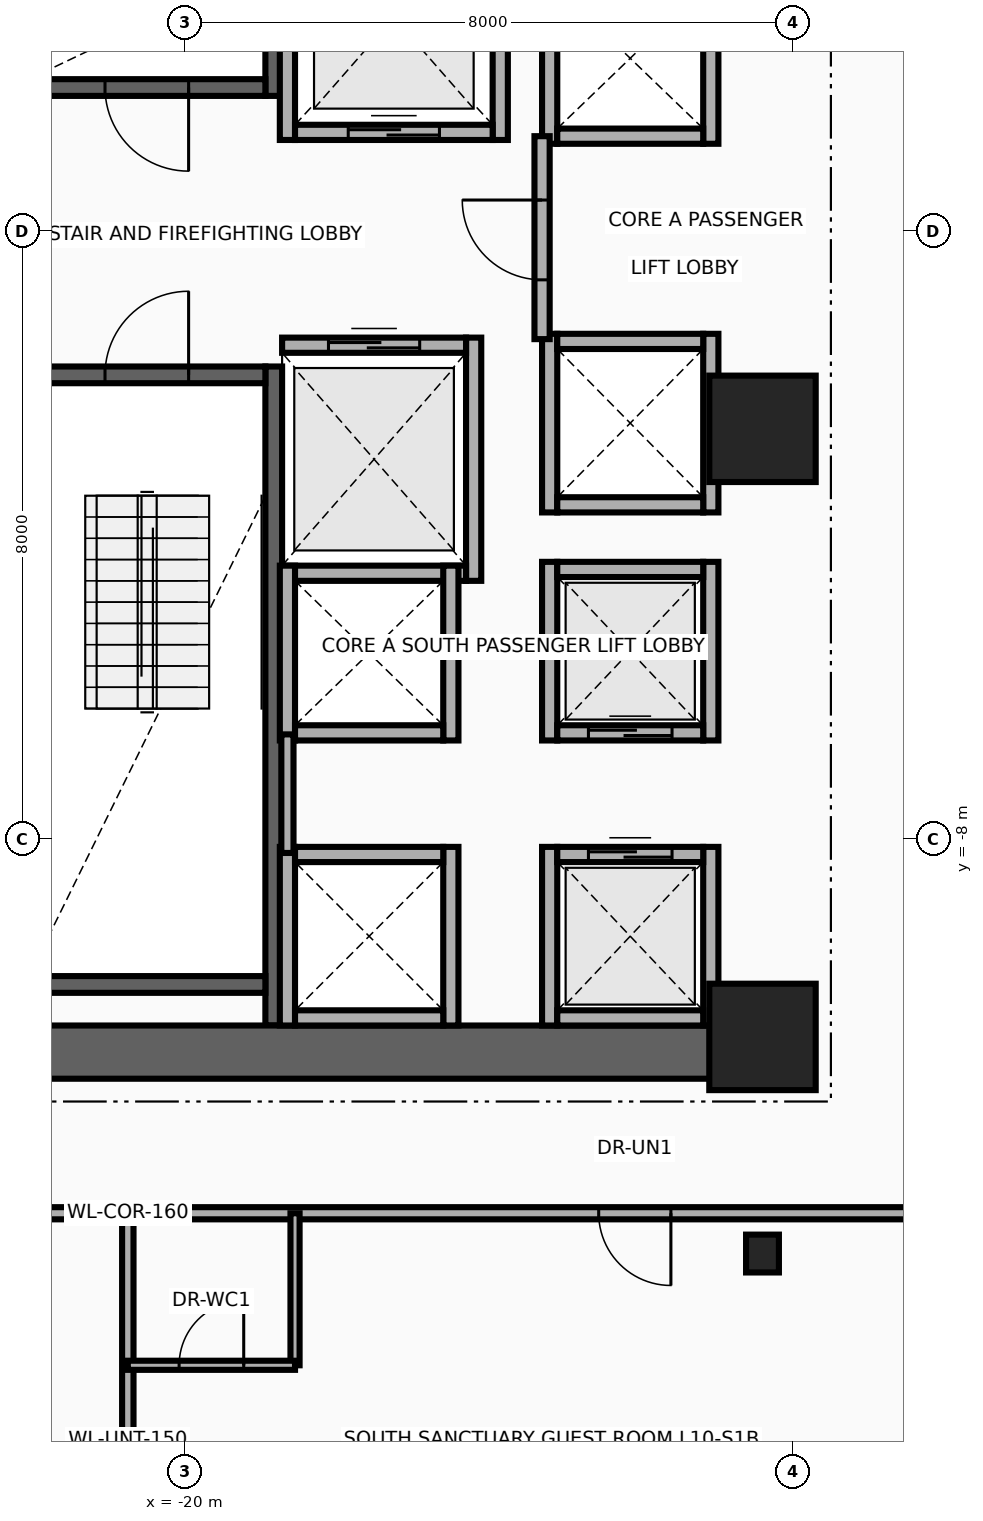
"""IFC4 building model, lengths in metres.
Left out: names, types, materials, properties, quantities, classifications, styles, units other than length and angle.
Written with IfcOpenShell. Run it as: python <this file> out.ifc"""

import sys

from ifc_helpers import new_model, si_unit, direction, frame, frame_2d, origin, origin_2d, place, context, subcontext, project, spatial, rectangle, i_section, extrude, source, transform, mapped, element, fill, save


model = new_model("IFC4")
c1 = context("Model", 3, precision=1e-05, world=origin(), true_north=direction((0.0, 1.0)))
c2 = subcontext(c1, "Body", "Model", "MODEL_VIEW")
j1 = project(units=[si_unit("LENGTHUNIT", "METRE"), si_unit("PLANEANGLEUNIT", "RADIAN")], contexts=[c1])
p1 = place(None, origin())
s1 = spatial("IfcSite", under=j1, at=p1, CompositionType="ELEMENT")
p2 = place(p1, origin())
s2 = spatial("IfcBuilding", under=s1, at=p2, CompositionType="ELEMENT")
p3 = place(p2, frame((0.0, 0.0, 44.5)))
s3 = spatial("IfcBuildingStorey", under=s2, at=p3, CompositionType="ELEMENT", Elevation=44.5)
p4 = place(p3, frame((-18.83, 1.78, 0.0), z_axis=(0.0, 0.0, 1.0), x_axis=(0.0, 1.0, 0.0)))
e1 = element("IfcWall", 1, at=p4, inside=s3, PredefinedType="SHEAR", context=c2, shape_type="SweptSolid", body=[
    extrude(rectangle(XDim=8.67, YDim=0.22, at=frame_2d((4.335, 0.0))), origin(), (0.0, 0.0, 1.0), 3.46),
])
p5 = place(p3, frame((-22.05, 1.89, 0.0), z_axis=(0.0, 0.0, 1.0), x_axis=(1.0, 0.0, 0.0)))
e2 = element("IfcWall", 2, at=p5, inside=s3, PredefinedType="SHEAR", context=c2, shape_type="SweptSolid", body=[
    extrude(rectangle(XDim=3.11, YDim=0.22, at=frame_2d((1.555, 0.0))), origin(), (0.0, 0.0, 1.0), 3.46),
])
p6 = place(p5, frame((1.0, 0.0, 0.0)))
e3 = element("IfcOpeningElement", 3, at=p6, cuts=e2, PredefinedType="OPENING", context=c2, shape_type="SweptSolid", body=[
    extrude(rectangle(XDim=1.1, YDim=2.15, at=frame_2d((0.55, 1.075))), frame((0.0, 0.125, 0.0), z_axis=(0.0, -1.0, 0.0), x_axis=(1.0, 0.0, 0.0)), (0.0, 0.0, 1.0), 0.25),
])
p7 = place(p3, frame((-18.83, -10.45, 0.0), z_axis=(0.0, 0.0, 1.0), x_axis=(0.0, 1.0, 0.0)))
e4 = element("IfcWall", 4, at=p7, inside=s3, PredefinedType="SHEAR", context=c2, shape_type="SweptSolid", body=[
    extrude(rectangle(XDim=8.67, YDim=0.22, at=frame_2d((4.335, 0.0))), origin(), (0.0, 0.0, 1.0), 3.46),
])
p8 = place(p3, frame((-22.05, -9.91, 0.0), z_axis=(0.0, 0.0, 1.0), x_axis=(1.0, 0.0, 0.0)))
e5 = element("IfcWall", 5, at=p8, inside=s3, PredefinedType="SHEAR", context=c2, shape_type="SweptSolid", body=[
    extrude(rectangle(XDim=3.11, YDim=0.22, at=frame_2d((1.555, 0.0))), origin(), (0.0, 0.0, 1.0), 3.46),
])
p9 = place(p3, frame((-22.05, -1.89, 0.0), z_axis=(0.0, 0.0, 1.0), x_axis=(1.0, 0.0, 0.0)))
e6 = element("IfcWall", 6, at=p9, inside=s3, PredefinedType="SHEAR", context=c2, shape_type="SweptSolid", body=[
    extrude(rectangle(XDim=3.11, YDim=0.22, at=frame_2d((1.555, 0.0))), origin(), (0.0, 0.0, 1.0), 3.46),
])
p10 = place(p9, frame((1.0, 0.0, 0.0)))
e7 = element("IfcOpeningElement", 7, at=p10, cuts=e6, PredefinedType="OPENING", context=c2, shape_type="SweptSolid", body=[
    extrude(rectangle(XDim=1.1, YDim=2.15, at=frame_2d((0.55, 1.075))), frame((0.0, 0.125, 0.0), z_axis=(0.0, -1.0, 0.0), x_axis=(1.0, 0.0, 0.0)), (0.0, 0.0, 1.0), 0.25),
])
p11 = place(p3, frame((-22.65, -10.8, 0.0), z_axis=(0.0, 0.0, 1.0), x_axis=(1.0, 0.0, 0.0)))
e8 = element("IfcWall", 8, at=p11, inside=s3, PredefinedType="SHEAR", context=c2, shape_type="SweptSolid", body=[
    extrude(rectangle(XDim=10.25, YDim=0.7, at=frame_2d((5.125, 0.0))), origin(), (0.0, 0.0, 1.0), 3.46),
])
m1 = source(origin(), c2, "Body", "SweptSolid", [
    extrude(rectangle(XDim=1.4, YDim=1.4, at=origin_2d()), origin(), (0.0, 0.0, 1.0), 3.7),
])
for number, where, z_axis, x_axis in (
    (9, (-12.4, -10.6, 0.0), (0.0, 0.0, 1.0), (1.0, 0.0, 0.0)),
    (10, (-12.4, -2.6, 0.0), (0.0, 0.0, 1.0), (1.0, 0.0, 0.0)),
):
    element("IfcColumn", number, at=place(p3, frame(where, z_axis=z_axis, x_axis=x_axis)), inside=s3, PredefinedType="COLUMN", context=c2, shape_type="MappedRepresentation", body=[
        mapped(m1, transform((0.0, 0.0, 0.0), x_axis=(1.0, 0.0, 0.0), y_axis=(0.0, 1.0, 0.0), z_axis=(0.0, 0.0, 1.0), scale=1.0)),
    ])
m2 = source(origin(), c2, "Body", "SweptSolid", [
    extrude(i_section(OverallWidth=0.432, OverallDepth=0.498, WebThickness=0.056, FlangeThickness=0.089, at=origin_2d()), origin(), (0.0, 0.0, 1.0), 3.7),
])
p12 = place(p3, frame((-12.4, -13.45, 0.0), z_axis=(0.0, 0.0, 1.0), x_axis=(1.0, 0.0, 0.0)))
e11 = element("IfcColumn", 11, at=p12, inside=s3, PredefinedType="COLUMN", context=c2, shape_type="MappedRepresentation", body=[
    mapped(m2, transform((0.0, 0.0, 0.0), x_axis=(1.0, 0.0, 0.0), y_axis=(0.0, 1.0, 0.0), z_axis=(0.0, 0.0, 1.0), scale=1.0)),
])
for number, where, z_axis, x_axis in (
    (12, (-18.65, 1.2, 0.0), (0.0, 0.0, 1.0), (0.0, 1.0, 0.0)),
    (13, (-15.85, 1.2, 0.0), (0.0, 0.0, 1.0), (0.0, 1.0, 0.0)),
):
    element("IfcWall", number, at=place(p3, frame(where, z_axis=z_axis, x_axis=x_axis)), inside=s3, PredefinedType="MOVABLE", context=c2, shape_type="SweptSolid", body=[
        extrude(rectangle(XDim=3.225, YDim=0.2, at=frame_2d((1.613, 0.0))), origin(), (0.0, 0.0, 1.0), 3.46),
    ])
p13 = place(p3, frame((-18.55, 1.3, 0.0), z_axis=(0.0, 0.0, 1.0), x_axis=(1.0, 0.0, 0.0)))
e14 = element("IfcWall", 14, at=p13, inside=s3, PredefinedType="MOVABLE", context=c2, shape_type="SweptSolid", body=[
    extrude(rectangle(XDim=2.6, YDim=0.2, at=frame_2d((1.3, 0.0))), origin(), (0.0, 0.0, 1.0), 3.46),
])
p14 = place(p13, frame((0.7, 0.0, 0.0)))
e15 = element("IfcOpeningElement", 15, at=p14, cuts=e14, PredefinedType="OPENING", context=c2, shape_type="SweptSolid", body=[
    extrude(rectangle(XDim=1.2, YDim=2.1, at=frame_2d((0.6, 1.05))), frame((0.0, 0.115, 0.0), z_axis=(0.0, -1.0, 0.0), x_axis=(1.0, 0.0, 0.0)), (0.0, 0.0, 1.0), 0.23),
])
p15 = place(p3, frame((-16.2, -4.6, 0.0), z_axis=(0.0, 0.0, 1.0), x_axis=(0.0, 1.0, 0.0)))
e16 = element("IfcWall", 16, at=p15, inside=s3, PredefinedType="MOVABLE", context=c2, shape_type="SweptSolid", body=[
    extrude(rectangle(XDim=3.2, YDim=0.2, at=frame_2d((1.6, 0.0))), origin(), (0.0, 0.0, 1.0), 3.46),
])
p16 = place(p3, frame((-18.72, -4.5, 0.0), z_axis=(0.0, 0.0, 1.0), x_axis=(1.0, 0.0, 0.0)))
e17 = element("IfcWall", 17, at=p16, inside=s3, PredefinedType="MOVABLE", context=c2, shape_type="SweptSolid", body=[
    extrude(rectangle(XDim=2.42, YDim=0.2, at=frame_2d((1.21, 0.0))), origin(), (0.0, 0.0, 1.0), 3.46),
])
p17 = place(p3, frame((-18.72, -1.5, 0.0), z_axis=(0.0, 0.0, 1.0), x_axis=(1.0, 0.0, 0.0)))
e18 = element("IfcWall", 18, at=p17, inside=s3, PredefinedType="MOVABLE", context=c2, shape_type="SweptSolid", body=[
    extrude(rectangle(XDim=2.42, YDim=0.2, at=frame_2d((1.21, 0.0))), origin(), (0.0, 0.0, 1.0), 3.46),
])
p18 = place(p17, frame((0.61, 0.0, 0.0)))
e19 = element("IfcOpeningElement", 19, at=p18, cuts=e18, PredefinedType="OPENING", context=c2, shape_type="SweptSolid", body=[
    extrude(rectangle(XDim=1.2, YDim=2.1, at=frame_2d((0.6, 1.05))), frame((0.0, 0.115, 0.0), z_axis=(0.0, -1.0, 0.0), x_axis=(1.0, 0.0, 0.0)), (0.0, 0.0, 1.0), 0.23),
])
for number, where, z_axis, x_axis in (
    (20, (-15.2, -10.45, 0.0), (0.0, 0.0, 1.0), (0.0, 1.0, 0.0)),
    (21, (-13.08, -10.45, 0.0), (0.0, 0.0, 1.0), (0.0, 1.0, 0.0)),
):
    element("IfcWall", number, at=place(p3, frame(where, z_axis=z_axis, x_axis=x_axis)), inside=s3, PredefinedType="MOVABLE", context=c2, shape_type="SweptSolid", body=[
        extrude(rectangle(XDim=2.35, YDim=0.2, at=frame_2d((1.175, 0.0))), origin(), (0.0, 0.0, 1.0), 2.583),
    ])
p19 = place(p3, frame((-15.1, -10.35, 0.0), z_axis=(0.0, 0.0, 1.0), x_axis=(1.0, 0.0, 0.0)))
e22 = element("IfcWall", 22, at=p19, inside=s3, PredefinedType="MOVABLE", context=c2, shape_type="SweptSolid", body=[
    extrude(rectangle(XDim=1.92, YDim=0.2, at=frame_2d((0.96, 0.0))), origin(), (0.0, 0.0, 1.0), 2.583),
])
p20 = place(p3, frame((-15.1, -8.2, 0.0), z_axis=(0.0, 0.0, 1.0), x_axis=(1.0, 0.0, 0.0)))
e23 = element("IfcWall", 23, at=p20, inside=s3, PredefinedType="MOVABLE", context=c2, shape_type="SweptSolid", body=[
    extrude(rectangle(XDim=1.92, YDim=0.2, at=frame_2d((0.96, 0.0))), origin(), (0.0, 0.0, 1.0), 3.46),
])
p21 = place(p20, frame((0.41, 0.0, 0.0)))
e24 = element("IfcOpeningElement", 24, at=p21, cuts=e23, PredefinedType="OPENING", context=c2, shape_type="SweptSolid", body=[
    extrude(rectangle(XDim=1.1, YDim=2.1, at=frame_2d((0.55, 1.05))), frame((0.0, 0.115, 0.0), z_axis=(0.0, -1.0, 0.0), x_axis=(1.0, 0.0, 0.0)), (0.0, 0.0, 1.0), 0.23),
])
for number, where, z_axis, x_axis in (
    (25, (-15.2, -6.7, 0.0), (0.0, 0.0, 1.0), (0.0, 1.0, 0.0)),
    (26, (-13.08, -6.7, 0.0), (0.0, 0.0, 1.0), (0.0, 1.0, 0.0)),
):
    element("IfcWall", number, at=place(p3, frame(where, z_axis=z_axis, x_axis=x_axis)), inside=s3, PredefinedType="MOVABLE", context=c2, shape_type="SweptSolid", body=[
        extrude(rectangle(XDim=2.35, YDim=0.2, at=frame_2d((1.175, 0.0))), origin(), (0.0, 0.0, 1.0), 3.46),
    ])
p22 = place(p3, frame((-15.1, -6.6, 0.0), z_axis=(0.0, 0.0, 1.0), x_axis=(1.0, 0.0, 0.0)))
e27 = element("IfcWall", 27, at=p22, inside=s3, PredefinedType="MOVABLE", context=c2, shape_type="SweptSolid", body=[
    extrude(rectangle(XDim=1.92, YDim=0.2, at=frame_2d((0.96, 0.0))), origin(), (0.0, 0.0, 1.0), 3.46),
])
p23 = place(p22, frame((0.41, 0.0, 0.0)))
e28 = element("IfcOpeningElement", 28, at=p23, cuts=e27, PredefinedType="OPENING", context=c2, shape_type="SweptSolid", body=[
    extrude(rectangle(XDim=1.1, YDim=2.1, at=frame_2d((0.55, 1.05))), frame((0.0, 0.115, 0.0), z_axis=(0.0, -1.0, 0.0), x_axis=(1.0, 0.0, 0.0)), (0.0, 0.0, 1.0), 0.23),
])
p24 = place(p3, frame((-15.1, -4.45, 0.0), z_axis=(0.0, 0.0, 1.0), x_axis=(1.0, 0.0, 0.0)))
e29 = element("IfcWall", 29, at=p24, inside=s3, PredefinedType="MOVABLE", context=c2, shape_type="SweptSolid", body=[
    extrude(rectangle(XDim=1.92, YDim=0.2, at=frame_2d((0.96, 0.0))), origin(), (0.0, 0.0, 1.0), 3.46),
])
for number, where, z_axis, x_axis in (
    (30, (-18.65, -10.45, 0.0), (0.0, 0.0, 1.0), (0.0, 1.0, 0.0)),
    (31, (-16.5, -10.45, 0.0), (0.0, 0.0, 1.0), (0.0, 1.0, 0.0)),
):
    element("IfcWall", number, at=place(p3, frame(where, z_axis=z_axis, x_axis=x_axis)), inside=s3, PredefinedType="MOVABLE", context=c2, shape_type="SweptSolid", body=[
        extrude(rectangle(XDim=2.35, YDim=0.2, at=frame_2d((1.175, 0.0))), origin(), (0.0, 0.0, 1.0), 2.583),
    ])
p25 = place(p3, frame((-18.55, -10.35, 0.0), z_axis=(0.0, 0.0, 1.0), x_axis=(1.0, 0.0, 0.0)))
e32 = element("IfcWall", 32, at=p25, inside=s3, PredefinedType="MOVABLE", context=c2, shape_type="SweptSolid", body=[
    extrude(rectangle(XDim=1.95, YDim=0.2, at=frame_2d((0.975, 0.0))), origin(), (0.0, 0.0, 1.0), 2.583),
])
p26 = place(p3, frame((-18.55, -8.2, 0.0), z_axis=(0.0, 0.0, 1.0), x_axis=(1.0, 0.0, 0.0)))
e33 = element("IfcWall", 33, at=p26, inside=s3, PredefinedType="MOVABLE", context=c2, shape_type="SweptSolid", body=[
    extrude(rectangle(XDim=1.95, YDim=0.2, at=frame_2d((0.975, 0.0))), origin(), (0.0, 0.0, 1.0), 3.46),
])
for number, where, z_axis, x_axis in (
    (34, (-15.2, 1.15, 0.0), (0.0, 0.0, 1.0), (0.0, 1.0, 0.0)),
    (35, (-13.08, 1.15, 0.0), (0.0, 0.0, 1.0), (0.0, 1.0, 0.0)),
):
    element("IfcWall", number, at=place(p3, frame(where, z_axis=z_axis, x_axis=x_axis)), inside=s3, PredefinedType="MOVABLE", context=c2, shape_type="SweptSolid", body=[
        extrude(rectangle(XDim=2.25, YDim=0.2, at=frame_2d((1.125, 0.0))), origin(), (0.0, 0.0, 1.0), 3.46),
    ])
p27 = place(p3, frame((-15.1, 1.25, 0.0), z_axis=(0.0, 0.0, 1.0), x_axis=(1.0, 0.0, 0.0)))
e36 = element("IfcWall", 36, at=p27, inside=s3, PredefinedType="MOVABLE", context=c2, shape_type="SweptSolid", body=[
    extrude(rectangle(XDim=1.92, YDim=0.2, at=frame_2d((0.96, 0.0))), origin(), (0.0, 0.0, 1.0), 3.46),
])
for number, where, z_axis, x_axis in (
    (37, (-18.65, -6.7, 0.0), (0.0, 0.0, 1.0), (0.0, 1.0, 0.0)),
    (38, (-16.5, -6.7, 0.0), (0.0, 0.0, 1.0), (0.0, 1.0, 0.0)),
):
    element("IfcWall", number, at=place(p3, frame(where, z_axis=z_axis, x_axis=x_axis)), inside=s3, PredefinedType="MOVABLE", context=c2, shape_type="SweptSolid", body=[
        extrude(rectangle(XDim=2.3, YDim=0.2, at=frame_2d((1.15, 0.0))), origin(), (0.0, 0.0, 1.0), 3.46),
    ])
p28 = place(p3, frame((-18.55, -6.6, 0.0), z_axis=(0.0, 0.0, 1.0), x_axis=(1.0, 0.0, 0.0)))
e39 = element("IfcWall", 39, at=p28, inside=s3, PredefinedType="MOVABLE", context=c2, shape_type="SweptSolid", body=[
    extrude(rectangle(XDim=1.95, YDim=0.2, at=frame_2d((0.975, 0.0))), origin(), (0.0, 0.0, 1.0), 3.46),
])
for number, where, z_axis, x_axis in (
    (40, (-15.2, -3.7, 0.0), (0.0, 0.0, 1.0), (0.0, 1.0, 0.0)),
    (41, (-13.08, -3.7, 0.0), (0.0, 0.0, 1.0), (0.0, 1.0, 0.0)),
):
    element("IfcWall", number, at=place(p3, frame(where, z_axis=z_axis, x_axis=x_axis)), inside=s3, PredefinedType="MOVABLE", context=c2, shape_type="SweptSolid", body=[
        extrude(rectangle(XDim=2.35, YDim=0.2, at=frame_2d((1.175, 0.0))), origin(), (0.0, 0.0, 1.0), 3.46),
    ])
for number, where, z_axis, x_axis in (
    (42, (-15.1, -3.6, 0.0), (0.0, 0.0, 1.0), (1.0, 0.0, 0.0)),
    (43, (-15.1, -1.45, 0.0), (0.0, 0.0, 1.0), (1.0, 0.0, 0.0)),
):
    element("IfcWall", number, at=place(p3, frame(where, z_axis=z_axis, x_axis=x_axis)), inside=s3, PredefinedType="MOVABLE", context=c2, shape_type="SweptSolid", body=[
        extrude(rectangle(XDim=1.92, YDim=0.2, at=frame_2d((0.96, 0.0))), origin(), (0.0, 0.0, 1.0), 3.46),
    ])
p29 = place(p3, frame((-15.3, -1.42, 0.0), z_axis=(0.0, 0.0, 1.0), x_axis=(0.0, 1.0, 0.0)))
e44 = element("IfcWall", 44, at=p29, inside=s3, PredefinedType="PARTITIONING", context=c2, shape_type="SweptSolid", body=[
    extrude(rectangle(XDim=2.67, YDim=0.2, at=frame_2d((1.335, 0.0))), origin(), (0.0, 0.0, 1.0), 3.46),
])
p30 = place(p29, frame((0.78, 0.0, 0.0)))
e45 = element("IfcOpeningElement", 45, at=p30, cuts=e44, PredefinedType="OPENING", context=c2, shape_type="SweptSolid", body=[
    extrude(rectangle(XDim=1.05, YDim=2.15, at=frame_2d((0.525, 1.075))), frame((0.0, 0.115, 0.0), z_axis=(0.0, -1.0, 0.0), x_axis=(1.0, 0.0, 0.0)), (0.0, 0.0, 1.0), 0.23),
])
p31 = place(p3, frame((-18.65, -8.18, 0.0), z_axis=(0.0, 0.0, 1.0), x_axis=(0.0, 1.0, 0.0)))
e46 = element("IfcWall", 46, at=p31, inside=s3, PredefinedType="PARTITIONING", context=c2, shape_type="SweptSolid", body=[
    extrude(rectangle(XDim=1.56, YDim=0.16, at=frame_2d((0.78, 0.0))), origin(), (0.0, 0.0, 1.0), 3.46),
])
p32 = place(p3, frame((-31.89, -12.92, 0.0), z_axis=(0.0, 0.0, 1.0), x_axis=(1.0, 0.0, 0.0)))
e47 = element("IfcWall", 47, at=p32, inside=s3, PredefinedType="PARTITIONING", context=c2, shape_type="SweptSolid", body=[
    extrude(rectangle(XDim=22.28, YDim=0.16, at=frame_2d((11.14, 0.0))), origin(), (0.0, 0.0, 1.0), 2.834),
])
p33 = place(p32, frame((6.195, 0.0, 0.0)))
e48 = element("IfcOpeningElement", 48, at=p33, cuts=e47, PredefinedType="OPENING", context=c2, shape_type="SweptSolid", body=[
    extrude(rectangle(XDim=0.95, YDim=2.15, at=frame_2d((0.475, 1.075))), frame((0.0, 0.095, 0.0), z_axis=(0.0, -1.0, 0.0), x_axis=(1.0, 0.0, 0.0)), (0.0, 0.0, 1.0), 0.19),
])
p34 = place(p32, frame((17.335, 0.0, 0.0)))
e49 = element("IfcOpeningElement", 49, at=p34, cuts=e47, PredefinedType="OPENING", context=c2, shape_type="SweptSolid", body=[
    extrude(rectangle(XDim=0.95, YDim=2.15, at=frame_2d((0.475, 1.075))), frame((0.0, 0.095, 0.0), z_axis=(0.0, -1.0, 0.0), x_axis=(1.0, 0.0, 0.0)), (0.0, 0.0, 1.0), 0.19),
])
p35 = place(p3, frame((-20.75, -18.89, 0.0), z_axis=(0.0, 0.0, 1.0), x_axis=(0.0, 1.0, 0.0)))
e50 = element("IfcWall", 50, at=p35, inside=s3, PredefinedType="PARTITIONING", context=c2, shape_type="SweptSolid", body=[
    extrude(rectangle(XDim=5.97, YDim=0.15, at=frame_2d((2.985, 0.0))), origin(), (0.0, 0.0, 1.0), 2.896),
])
p36 = place(p3, frame((-18.55, -14.92, 0.0), z_axis=(0.0, 0.0, 1.0), x_axis=(0.0, 1.0, 0.0)))
e51 = element("IfcWall", 51, at=p36, inside=s3, PredefinedType="PARTITIONING", context=c2, shape_type="SweptSolid", body=[
    extrude(rectangle(XDim=2.0, YDim=0.12, at=frame_2d((1.0, 0.0))), origin(), (0.0, 0.0, 1.0), 2.896),
])
p37 = place(p3, frame((-20.75, -14.92, 0.0), z_axis=(0.0, 0.0, 1.0), x_axis=(1.0, 0.0, 0.0)))
e52 = element("IfcWall", 52, at=p37, inside=s3, PredefinedType="PARTITIONING", context=c2, shape_type="SweptSolid", body=[
    extrude(rectangle(XDim=2.2, YDim=0.12, at=frame_2d((1.1, 0.0))), origin(), (0.0, 0.0, 1.0), 3.46),
])
p38 = place(p37, frame((0.675, 0.0, 0.0)))
e53 = element("IfcOpeningElement", 53, at=p38, cuts=e52, PredefinedType="OPENING", context=c2, shape_type="SweptSolid", body=[
    extrude(rectangle(XDim=0.85, YDim=2.1, at=frame_2d((0.425, 1.05))), frame((0.0, 0.075, 0.0), z_axis=(0.0, -1.0, 0.0), x_axis=(1.0, 0.0, 0.0)), (0.0, 0.0, 1.0), 0.15),
])
p39 = place(p14, origin())
e54 = element("IfcDoor", 54, at=p39, inside=s3, OperationType="DOUBLE_DOOR_SLIDING", PredefinedType="DOOR", context=c2, shape_type="SweptSolid", body=[
    extrude(rectangle(XDim=1.2, YDim=2.1, at=frame_2d((0.6, 1.05))), frame((0.0, 0.025, 0.0), z_axis=(0.0, -1.0, 0.0), x_axis=(1.0, 0.0, 0.0)), (0.0, 0.0, 1.0), 0.05),
])
fill(e15, e54)
p40 = place(p18, origin())
e55 = element("IfcDoor", 55, at=p40, inside=s3, OperationType="DOUBLE_DOOR_SLIDING", PredefinedType="DOOR", context=c2, shape_type="SweptSolid", body=[
    extrude(rectangle(XDim=1.2, YDim=2.1, at=frame_2d((0.6, 1.05))), frame((0.0, 0.025, 0.0), z_axis=(0.0, -1.0, 0.0), x_axis=(1.0, 0.0, 0.0)), (0.0, 0.0, 1.0), 0.05),
])
fill(e19, e55)
p41 = place(p21, origin())
e56 = element("IfcDoor", 56, at=p41, inside=s3, OperationType="DOUBLE_DOOR_SLIDING", PredefinedType="DOOR", context=c2, shape_type="SweptSolid", body=[
    extrude(rectangle(XDim=1.1, YDim=2.1, at=frame_2d((0.55, 1.05))), frame((0.0, 0.025, 0.0), z_axis=(0.0, -1.0, 0.0), x_axis=(1.0, 0.0, 0.0)), (0.0, 0.0, 1.0), 0.05),
])
fill(e24, e56)
p42 = place(p23, origin())
e57 = element("IfcDoor", 57, at=p42, inside=s3, OperationType="DOUBLE_DOOR_SLIDING", PredefinedType="DOOR", context=c2, shape_type="SweptSolid", body=[
    extrude(rectangle(XDim=1.1, YDim=2.1, at=frame_2d((0.55, 1.05))), frame((0.0, 0.025, 0.0), z_axis=(0.0, -1.0, 0.0), x_axis=(1.0, 0.0, 0.0)), (0.0, 0.0, 1.0), 0.05),
])
fill(e28, e57)
p43 = place(p30, origin())
e58 = element("IfcDoor", 58, at=p43, inside=s3, OperationType="SINGLE_SWING_RIGHT", PredefinedType="DOOR", context=c2, shape_type="SweptSolid", body=[
    extrude(rectangle(XDim=1.05, YDim=2.15, at=frame_2d((0.525, 1.075))), frame((0.0, 0.025, 0.0), z_axis=(0.0, -1.0, 0.0), x_axis=(1.0, 0.0, 0.0)), (0.0, 0.0, 1.0), 0.05),
])
fill(e45, e58)
p44 = place(p6, frame((1.1, 0.0, 0.0), z_axis=(0.0, 0.0, 1.0), x_axis=(-1.0, 0.0, 0.0)))
e59 = element("IfcDoor", 59, at=p44, inside=s3, OperationType="SINGLE_SWING_LEFT", PredefinedType="DOOR", context=c2, shape_type="SweptSolid", body=[
    extrude(rectangle(XDim=1.1, YDim=2.15, at=frame_2d((0.55, 1.075))), frame((0.0, 0.025, 0.0), z_axis=(0.0, -1.0, 0.0), x_axis=(1.0, 0.0, 0.0)), (0.0, 0.0, 1.0), 0.05),
])
fill(e3, e59)
p45 = place(p10, origin())
e60 = element("IfcDoor", 60, at=p45, inside=s3, OperationType="SINGLE_SWING_RIGHT", PredefinedType="DOOR", context=c2, shape_type="SweptSolid", body=[
    extrude(rectangle(XDim=1.1, YDim=2.15, at=frame_2d((0.55, 1.075))), frame((0.0, 0.025, 0.0), z_axis=(0.0, -1.0, 0.0), x_axis=(1.0, 0.0, 0.0)), (0.0, 0.0, 1.0), 0.05),
])
fill(e7, e60)
p46 = place(p34, frame((0.95, 0.0, 0.0), z_axis=(0.0, 0.0, 1.0), x_axis=(-1.0, 0.0, 0.0)))
e61 = element("IfcDoor", 61, at=p46, inside=s3, OperationType="SINGLE_SWING_LEFT", PredefinedType="DOOR", context=c2, shape_type="SweptSolid", body=[
    extrude(rectangle(XDim=0.95, YDim=2.15, at=frame_2d((0.475, 1.075))), frame((0.0, 0.025, 0.0), z_axis=(0.0, -1.0, 0.0), x_axis=(1.0, 0.0, 0.0)), (0.0, 0.0, 1.0), 0.05),
])
fill(e49, e61)
p47 = place(p38, origin())
e62 = element("IfcDoor", 62, at=p47, inside=s3, OperationType="SINGLE_SWING_RIGHT", PredefinedType="DOOR", context=c2, shape_type="SweptSolid", body=[
    extrude(rectangle(XDim=0.85, YDim=2.1, at=frame_2d((0.425, 1.05))), frame((0.0, 0.025, 0.0), z_axis=(0.0, -1.0, 0.0), x_axis=(1.0, 0.0, 0.0)), (0.0, 0.0, 1.0), 0.05),
])
fill(e53, e62)
save(model, sys.argv[1])
